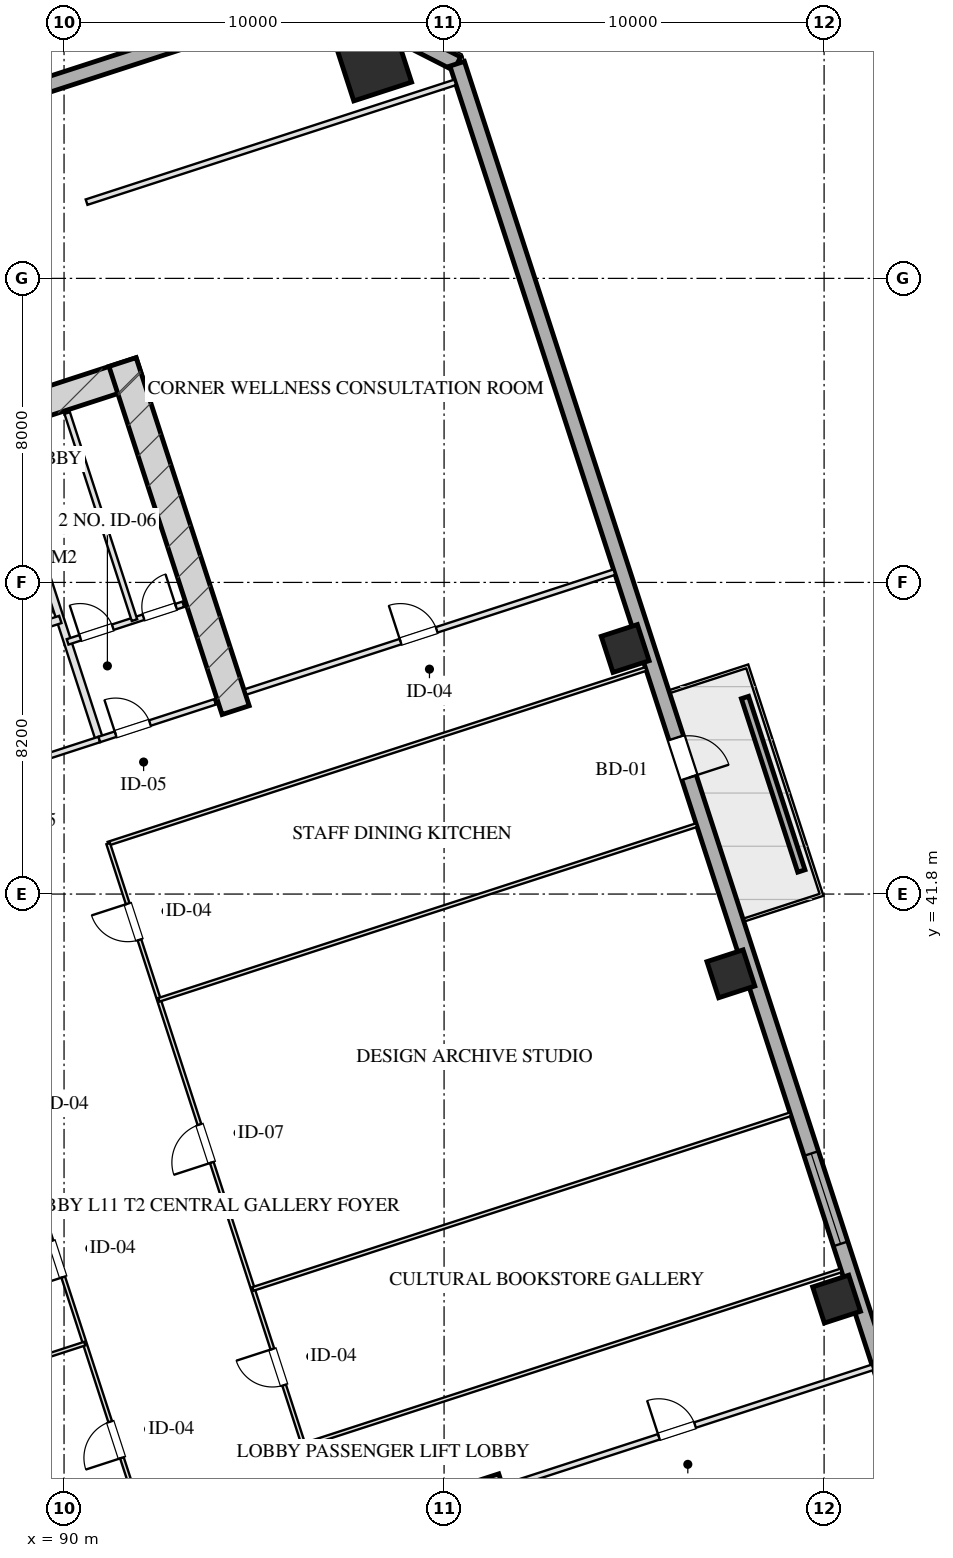
"""IFC4 building model, lengths in metres.
Left out: names, types, materials, properties, quantities, classifications, styles, units other than length and angle.
Written with IfcOpenShell. Run it as: python <this file> out.ifc"""

import sys

from ifc_helpers import new_model, si_unit, direction, frame, frame_2d, origin, origin_2d, place, context, subcontext, project, spatial, rectangle, hollow_rectangle, extrude, element, fill, save


model = new_model("IFC4")
c1 = context("Model", 3, precision=1e-05, world=origin(), true_north=direction((0.0, 1.0)))
c2 = subcontext(c1, "Body", "Model", "MODEL_VIEW")
j1 = project(units=[si_unit("LENGTHUNIT", "METRE"), si_unit("PLANEANGLEUNIT", "RADIAN")], contexts=[c1])
p1 = place(None, origin())
s1 = spatial("IfcSite", under=j1, at=p1, CompositionType="ELEMENT")
p2 = place(p1, origin())
s2 = spatial("IfcBuilding", under=s1, at=p2, CompositionType="ELEMENT")
p3 = place(p2, frame((0.0, 0.0, 50.6)))
s3 = spatial("IfcBuildingStorey", under=s2, at=p3, CompositionType="ELEMENT", Elevation=50.6)
p4 = place(p3, frame((101.082, 26.429, 0.0), z_axis=(0.0, 0.0, 1.0), x_axis=(0.309016134813, -0.951056795583, 0.0)))
e1 = element("IfcWall", 1, at=p4, inside=s3, PredefinedType="SHEAR", context=c2, shape_type="SweptSolid", body=[
    extrude(rectangle(XDim=9.63, YDim=0.75, at=frame_2d((4.815, 0.0))), origin(), (0.0, 0.0, 1.0), 3.45),
])
p5 = place(p3, frame((76.272, 50.443, 0.0), z_axis=(0.0, 0.0, 1.0), x_axis=(0.951056072937, 0.309018358888, 0.0)))
e2 = element("IfcWall", 2, at=p5, inside=s3, PredefinedType="SHEAR", context=c2, shape_type="SweptSolid", body=[
    extrude(rectangle(XDim=16.55, YDim=0.75, at=frame_2d((8.275, 0.0))), origin(), (0.0, 0.0, 1.0), 3.45),
])
p6 = place(p3, frame((94.515, 46.639, 0.0), z_axis=(0.0, 0.0, 1.0), x_axis=(-0.309016134813, 0.951056795583, 0.0)))
e3 = element("IfcWall", 3, at=p6, inside=s3, PredefinedType="SHEAR", context=c2, shape_type="SweptSolid", body=[
    extrude(rectangle(XDim=9.63, YDim=0.75, at=frame_2d((4.815, 0.0))), origin(), (0.0, 0.0, 1.0), 3.45),
])
p7 = place(p3, frame((98.137, 63.677, 0.0), z_axis=(0.0, 0.0, 1.0), x_axis=(0.951056516295, 0.309016994375, 0.0)))
e4 = element("IfcColumn", 4, at=p7, inside=s3, PredefinedType="COLUMN", context=c2, shape_type="SweptSolid", body=[
    extrude(hollow_rectangle(XDim=1.6, YDim=1.6, WallThickness=0.055, at=origin_2d()), origin(), (0.0, 0.0, 1.0), 3.451),
])
for number, where, z_axis, x_axis in (
    (5, (110.328, 31.142, 0.0), (0.0, 0.0, 1.0), (0.951, 0.309, 0.0)),
    (6, (107.547, 39.701, 0.0), (0.0, 0.0, 1.0), (0.951, 0.309, 0.0)),
    (7, (104.766, 48.261, 0.0), (0.0, 0.0, 1.0), (0.951, 0.309, 0.0)),
):
    element("IfcColumn", number, at=place(p3, frame(where, z_axis=z_axis, x_axis=x_axis)), inside=s3, PredefinedType="COLUMN", context=c2, shape_type="SweptSolid", body=[
        extrude(hollow_rectangle(XDim=1.0, YDim=1.0, WallThickness=0.036, at=origin_2d()), origin(), (0.0, 0.0, 1.0), 3.451),
    ])
p8 = place(p3, frame((66.002, 55.433, 0.0), z_axis=(0.0, 0.0, 1.0), x_axis=(0.951055939317, 0.309018770125, 0.0)))
e8 = element("IfcWall", 8, at=p8, inside=s3, PredefinedType="SOLIDWALL", context=c2, shape_type="SweptSolid", body=[
    extrude(rectangle(XDim=32.4, YDim=0.4, at=frame_2d((16.2, 0.0))), origin(), (0.0, 0.0, 1.0), 2.61),
])
p9 = place(p3, frame((96.816, 65.446, 0.0), z_axis=(0.0, 0.0, 1.0), x_axis=(0.890998089617, -0.454007053137, 0.0)))
e9 = element("IfcWall", 9, at=p9, inside=s3, PredefinedType="SOLIDWALL", context=c2, shape_type="SweptSolid", body=[
    extrude(rectangle(XDim=3.96, YDim=0.4, at=frame_2d((1.98, 0.0))), origin(), (0.0, 0.0, 1.0), 2.61),
])
p10 = place(p3, frame((100.345, 63.648, 0.0), z_axis=(0.0, 0.0, 1.0), x_axis=(0.309014526607, -0.951057318118, 0.0)))
e10 = element("IfcWall", 10, at=p10, inside=s3, PredefinedType="SOLIDWALL", context=c2, shape_type="SweptSolid", body=[
    extrude(rectangle(XDim=50.0, YDim=0.4, at=frame_2d((25.0, 0.0))), origin(), (0.0, 0.0, 1.0), 2.61),
])
p11 = place(p10, frame((30.15, 0.0, 0.75)))
e11 = element("IfcOpeningElement", 11, at=p11, cuts=e10, PredefinedType="OPENING", context=c2, shape_type="SweptSolid", body=[
    extrude(rectangle(XDim=2.5, YDim=1.46, at=frame_2d((1.25, 0.73))), frame((0.0, 0.21, 0.0), z_axis=(0.0, -1.0, 0.0), x_axis=(1.0, 0.0, 0.0)), (0.0, 0.0, 1.0), 0.42),
])
p12 = place(p10, frame((18.65, 0.0, 0.0)))
e12 = element("IfcOpeningElement", 12, at=p12, cuts=e10, PredefinedType="OPENING", context=c2, shape_type="SweptSolid", body=[
    extrude(rectangle(XDim=1.1, YDim=2.15, at=frame_2d((0.55, 1.075))), frame((0.0, 0.21, 0.0), z_axis=(0.0, -1.0, 0.0), x_axis=(1.0, 0.0, 0.0)), (0.0, 0.0, 1.0), 0.42),
])
p13 = place(p3, frame((109.402, 42.407, 0.0), z_axis=(0.0, 0.0, 1.0), x_axis=(-0.30900096172, 0.951061725471, 0.0)))
e13 = element("IfcWall", 13, at=p13, inside=s3, PredefinedType="PARAPET", context=c2, shape_type="SweptSolid", body=[
    extrude(rectangle(XDim=4.8, YDim=0.2, at=frame_2d((2.4, 0.0))), origin(), (0.0, 0.0, 1.0), 0.75),
])
p14 = place(p3, frame((90.928, 45.868, 0.0), z_axis=(0.0, 0.0, 1.0), x_axis=(-0.309042196757, 0.951048327176, 0.0)))
e14 = element("IfcWall", 14, at=p14, inside=s3, PredefinedType="PARTITIONING", context=c2, shape_type="SweptSolid", body=[
    extrude(rectangle(XDim=8.43, YDim=0.2, at=frame_2d((4.215, 0.0))), origin(), (0.0, 0.0, 1.0), 3.175),
])
p15 = place(p3, frame((86.743, 44.508, 0.0), z_axis=(0.0, 0.0, 1.0), x_axis=(0.951063829732, 0.308994485023, 0.0)))
e15 = element("IfcWall", 15, at=p15, inside=s3, PredefinedType="PARTITIONING", context=c2, shape_type="SweptSolid", body=[
    extrude(rectangle(XDim=4.4, YDim=0.15, at=frame_2d((2.2, 0.0))), origin(), (0.0, 0.0, 1.0), 3.175),
])
p16 = place(p15, frame((1.45, 0.0, 0.0)))
e16 = element("IfcOpeningElement", 16, at=p16, cuts=e15, PredefinedType="OPENING", context=c2, shape_type="SweptSolid", body=[
    extrude(rectangle(XDim=1.5, YDim=2.05, at=frame_2d((0.75, 1.025))), frame((0.0, 0.085, 0.0), z_axis=(0.0, -1.0, 0.0), x_axis=(1.0, 0.0, 0.0)), (0.0, 0.0, 1.0), 0.17),
])
p17 = place(p3, frame((85.718, 47.666, 0.0), z_axis=(0.0, 0.0, 1.0), x_axis=(0.951058531764, 0.30901079133, 0.0)))
e17 = element("IfcWall", 17, at=p17, inside=s3, PredefinedType="PARTITIONING", context=c2, shape_type="SweptSolid", body=[
    extrude(rectangle(XDim=4.4, YDim=0.2, at=frame_2d((2.2, 0.0))), origin(), (0.0, 0.0, 1.0), 3.175),
])
p18 = place(p17, frame((0.45, 0.0, 0.0)))
e18 = element("IfcOpeningElement", 18, at=p18, cuts=e17, PredefinedType="OPENING", context=c2, shape_type="SweptSolid", body=[
    extrude(rectangle(XDim=1.1, YDim=2.05, at=frame_2d((0.55, 1.025))), frame((0.0, 0.11, 0.0), z_axis=(0.0, -1.0, 0.0), x_axis=(1.0, 0.0, 0.0)), (0.0, 0.0, 1.0), 0.22),
])
p19 = place(p17, frame((2.55, 0.0, 0.0)))
e19 = element("IfcOpeningElement", 19, at=p19, cuts=e17, PredefinedType="OPENING", context=c2, shape_type="SweptSolid", body=[
    extrude(rectangle(XDim=1.1, YDim=2.05, at=frame_2d((0.55, 1.025))), frame((0.0, 0.11, 0.0), z_axis=(0.0, -1.0, 0.0), x_axis=(1.0, 0.0, 0.0)), (0.0, 0.0, 1.0), 0.22),
])
p20 = place(p3, frame((90.928, 45.868, 0.0), z_axis=(0.0, 0.0, 1.0), x_axis=(0.951059297078, 0.309008435874, 0.0)))
e20 = element("IfcWall", 20, at=p20, inside=s3, PredefinedType="PARTITIONING", context=c2, shape_type="SweptSolid", body=[
    extrude(rectangle(XDim=3.2, YDim=0.15, at=frame_2d((1.6, 0.0))), origin(), (0.0, 0.0, 1.0), 3.175),
])
p21 = place(p20, frame((0.45, 0.0, 0.0)))
e21 = element("IfcOpeningElement", 21, at=p21, cuts=e20, PredefinedType="OPENING", context=c2, shape_type="SweptSolid", body=[
    extrude(rectangle(XDim=0.95, YDim=2.05, at=frame_2d((0.475, 1.025))), frame((0.0, 0.085, 0.0), z_axis=(0.0, -1.0, 0.0), x_axis=(1.0, 0.0, 0.0)), (0.0, 0.0, 1.0), 0.17),
])
p22 = place(p3, frame((90.094, 48.436, 0.0), z_axis=(0.0, 0.0, 1.0), x_axis=(0.951066581729, 0.308986014439, 0.0)))
e22 = element("IfcWall", 22, at=p22, inside=s3, PredefinedType="PARTITIONING", context=c2, shape_type="SweptSolid", body=[
    extrude(rectangle(XDim=3.2, YDim=0.15, at=frame_2d((1.6, 0.0))), origin(), (0.0, 0.0, 1.0), 3.175),
])
p23 = place(p22, frame((0.35, 0.0, 0.0)))
e23 = element("IfcOpeningElement", 23, at=p23, cuts=e22, PredefinedType="OPENING", context=c2, shape_type="SweptSolid", body=[
    extrude(rectangle(XDim=0.9, YDim=2.05, at=frame_2d((0.45, 1.025))), frame((0.0, 0.085, 0.0), z_axis=(0.0, -1.0, 0.0), x_axis=(1.0, 0.0, 0.0)), (0.0, 0.0, 1.0), 0.17),
])
p24 = place(p22, frame((2.1, 0.0, 0.0)))
e24 = element("IfcOpeningElement", 24, at=p24, cuts=e22, PredefinedType="OPENING", context=c2, shape_type="SweptSolid", body=[
    extrude(rectangle(XDim=0.9, YDim=2.05, at=frame_2d((0.45, 1.025))), frame((0.0, 0.085, 0.0), z_axis=(0.0, -1.0, 0.0), x_axis=(1.0, 0.0, 0.0)), (0.0, 0.0, 1.0), 0.17),
])
p25 = place(p3, frame((91.853, 49.007, 0.0), z_axis=(0.0, 0.0, 1.0), x_axis=(-0.309022487551, 0.951054731437, 0.0)))
e25 = element("IfcWall", 25, at=p25, inside=s3, PredefinedType="PARTITIONING", context=c2, shape_type="SweptSolid", body=[
    extrude(rectangle(XDim=5.73, YDim=0.15, at=frame_2d((2.865, 0.0))), origin(), (0.0, 0.0, 1.0), 3.175),
])
p26 = place(p3, frame((101.578, 26.196, 0.0), z_axis=(0.0, 0.0, 1.0), x_axis=(0.951059043131, 0.309009217467, 0.0)))
e26 = element("IfcWall", 26, at=p26, inside=s3, PredefinedType="PARTITIONING", context=c2, shape_type="SweptSolid", body=[
    extrude(rectangle(XDim=10.2, YDim=0.15, at=frame_2d((5.1, 0.0))), origin(), (0.0, 0.0, 1.0), 3.175),
])
p27 = place(p26, frame((4.284, 0.0, 0.0)))
e27 = element("IfcOpeningElement", 27, at=p27, cuts=e26, PredefinedType="OPENING", context=c2, shape_type="SweptSolid", body=[
    extrude(rectangle(XDim=1.0, YDim=2.05, at=frame_2d((0.5, 1.025))), frame((0.0, 0.085, 0.0), z_axis=(0.0, -1.0, 0.0), x_axis=(1.0, 0.0, 0.0)), (0.0, 0.0, 1.0), 0.17),
])
p28 = place(p3, frame((90.593, 60.006, 0.0), z_axis=(0.0, 0.0, 1.0), x_axis=(0.951059043131, 0.309009217467, 0.0)))
e28 = element("IfcWall", 28, at=p28, inside=s3, PredefinedType="PARTITIONING", context=c2, shape_type="SweptSolid", body=[
    extrude(rectangle(XDim=10.2, YDim=0.15, at=frame_2d((5.1, 0.0))), origin(), (0.0, 0.0, 1.0), 3.175),
])
p29 = place(p3, frame((94.78, 47.119, 0.0), z_axis=(0.0, 0.0, 1.0), x_axis=(0.951054294345, 0.309023832749, 0.0)))
e29 = element("IfcWall", 29, at=p29, inside=s3, PredefinedType="PARTITIONING", context=c2, shape_type="SweptSolid", body=[
    extrude(rectangle(XDim=10.2, YDim=0.15, at=frame_2d((5.1, 0.0))), origin(), (0.0, 0.0, 1.0), 3.175),
])
p30 = place(p29, frame((4.284, 0.0, 0.0)))
e30 = element("IfcOpeningElement", 30, at=p30, cuts=e29, PredefinedType="OPENING", context=c2, shape_type="SweptSolid", body=[
    extrude(rectangle(XDim=1.0, YDim=2.05, at=frame_2d((0.5, 1.025))), frame((0.0, 0.085, 0.0), z_axis=(0.0, -1.0, 0.0), x_axis=(1.0, 0.0, 0.0)), (0.0, 0.0, 1.0), 0.17),
])
for number, where, z_axis, x_axis in (
    (31, (96.304, 27.3, 0.0), (0.0, 0.0, 1.0), (0.951, 0.309, 0.0)),
    (32, (91.162, 43.126, 0.0), (0.0, 0.0, 1.0), (0.951, 0.309, 0.0)),
):
    element("IfcWall", number, at=place(p3, frame(where, z_axis=z_axis, x_axis=x_axis)), inside=s3, PredefinedType="MOVABLE", context=c2, shape_type="SweptSolid", body=[
        extrude(rectangle(XDim=14.875, YDim=0.1, at=frame_2d((7.438, 0.0))), origin(), (0.0, 0.0, 1.0), 3.175),
    ])
p31 = place(p3, frame((91.882, 25.863, 0.0), z_axis=(0.0, 0.0, 1.0), x_axis=(-0.309022042254, 0.951054876125, 0.0)))
e33 = element("IfcWall", 33, at=p31, inside=s3, PredefinedType="MOVABLE", context=c2, shape_type="SweptSolid", body=[
    extrude(rectangle(XDim=16.64, YDim=0.1, at=frame_2d((8.32, 0.0))), origin(), (0.0, 0.0, 1.0), 3.175),
])
p32 = place(p31, frame((1.16, 0.0, 0.0)))
e34 = element("IfcOpeningElement", 34, at=p32, cuts=e33, PredefinedType="OPENING", context=c2, shape_type="SweptSolid", body=[
    extrude(rectangle(XDim=1.0, YDim=2.05, at=frame_2d((0.5, 1.025))), frame((0.0, 0.06, 0.0), z_axis=(0.0, -1.0, 0.0), x_axis=(1.0, 0.0, 0.0)), (0.0, 0.0, 1.0), 0.12),
])
p33 = place(p31, frame((6.16, 0.0, 0.0)))
e35 = element("IfcOpeningElement", 35, at=p33, cuts=e33, PredefinedType="OPENING", context=c2, shape_type="SweptSolid", body=[
    extrude(rectangle(XDim=1.0, YDim=2.05, at=frame_2d((0.5, 1.025))), frame((0.0, 0.06, 0.0), z_axis=(0.0, -1.0, 0.0), x_axis=(1.0, 0.0, 0.0)), (0.0, 0.0, 1.0), 0.12),
])
p34 = place(p31, frame((10.16, 0.0, 0.0)))
e36 = element("IfcOpeningElement", 36, at=p34, cuts=e33, PredefinedType="OPENING", context=c2, shape_type="SweptSolid", body=[
    extrude(rectangle(XDim=1.0, YDim=2.05, at=frame_2d((0.5, 1.025))), frame((0.0, 0.06, 0.0), z_axis=(0.0, -1.0, 0.0), x_axis=(1.0, 0.0, 0.0)), (0.0, 0.0, 1.0), 0.12),
])
p35 = place(p31, frame((14.48, 0.0, 0.0)))
e37 = element("IfcOpeningElement", 37, at=p35, cuts=e33, PredefinedType="OPENING", context=c2, shape_type="SweptSolid", body=[
    extrude(rectangle(XDim=1.0, YDim=2.05, at=frame_2d((0.5, 1.025))), frame((0.0, 0.06, 0.0), z_axis=(0.0, -1.0, 0.0), x_axis=(1.0, 0.0, 0.0)), (0.0, 0.0, 1.0), 0.12),
])
p36 = place(p3, frame((96.304, 27.3, 0.0), z_axis=(0.0, 0.0, 1.0), x_axis=(-0.30901773025, 0.951056277195, 0.0)))
e38 = element("IfcWall", 38, at=p36, inside=s3, PredefinedType="MOVABLE", context=c2, shape_type="SweptSolid", body=[
    extrude(rectangle(XDim=16.64, YDim=0.1, at=frame_2d((8.32, 0.0))), origin(), (0.0, 0.0, 1.0), 3.175),
])
p37 = place(p36, frame((1.66, 0.0, 0.0)))
e39 = element("IfcOpeningElement", 39, at=p37, cuts=e38, PredefinedType="OPENING", context=c2, shape_type="SweptSolid", body=[
    extrude(rectangle(XDim=1.0, YDim=2.05, at=frame_2d((0.5, 1.025))), frame((0.0, 0.06, 0.0), z_axis=(0.0, -1.0, 0.0), x_axis=(1.0, 0.0, 0.0)), (0.0, 0.0, 1.0), 0.12),
])
p38 = place(p36, frame((7.82, 0.0, 0.0)))
e40 = element("IfcOpeningElement", 40, at=p38, cuts=e38, PredefinedType="OPENING", context=c2, shape_type="SweptSolid", body=[
    extrude(rectangle(XDim=1.05, YDim=2.05, at=frame_2d((0.525, 1.025))), frame((0.0, 0.06, 0.0), z_axis=(0.0, -1.0, 0.0), x_axis=(1.0, 0.0, 0.0)), (0.0, 0.0, 1.0), 0.12),
])
p39 = place(p36, frame((13.98, 0.0, 0.0)))
e41 = element("IfcOpeningElement", 41, at=p39, cuts=e38, PredefinedType="OPENING", context=c2, shape_type="SweptSolid", body=[
    extrude(rectangle(XDim=1.0, YDim=2.05, at=frame_2d((0.5, 1.025))), frame((0.0, 0.06, 0.0), z_axis=(0.0, -1.0, 0.0), x_axis=(1.0, 0.0, 0.0)), (0.0, 0.0, 1.0), 0.12),
])
p40 = place(p3, frame((73.356, 24.386, 0.0), z_axis=(0.0, 0.0, 1.0), x_axis=(0.951057491432, 0.309013993197, 0.0)))
e42 = element("IfcWall", 42, at=p40, inside=s3, PredefinedType="MOVABLE", context=c2, shape_type="SweptSolid", body=[
    extrude(rectangle(XDim=18.075, YDim=0.1, at=frame_2d((9.038, 0.0))), origin(), (0.0, 0.0, 1.0), 3.175),
])
for number, where, z_axis, x_axis in (
    (43, (94.969, 31.409, 0.0), (0.0, 0.0, 1.0), (0.951, 0.309, 0.0)),
    (44, (92.497, 39.017, 0.0), (0.0, 0.0, 1.0), (0.951, 0.309, 0.0)),
):
    element("IfcWall", number, at=place(p3, frame(where, z_axis=z_axis, x_axis=x_axis)), inside=s3, PredefinedType="MOVABLE", context=c2, shape_type="SweptSolid", body=[
        extrude(rectangle(XDim=14.875, YDim=0.1, at=frame_2d((7.438, 0.0))), origin(), (0.0, 0.0, 1.0), 3.175),
    ])
p41 = place(p11, origin())
e45 = element("IfcWindow", 45, at=p41, inside=s3, PartitioningType="TRIPLE_PANEL_VERTICAL", PredefinedType="WINDOW", context=c2, shape_type="SweptSolid", body=[
    extrude(rectangle(XDim=2.5, YDim=1.46, at=frame_2d((1.25, 0.73))), frame((0.0, 0.03, 0.0), z_axis=(0.0, -1.0, 0.0), x_axis=(1.0, 0.0, 0.0)), (0.0, 0.0, 1.0), 0.06),
])
fill(e11, e45)
p42 = place(p12, origin())
e46 = element("IfcDoor", 46, at=p42, inside=s3, OperationType="SINGLE_SWING_RIGHT", PredefinedType="DOOR", context=c2, shape_type="SweptSolid", body=[
    extrude(rectangle(XDim=1.1, YDim=2.15, at=frame_2d((0.55, 1.075))), frame((0.0, 0.025, 0.0), z_axis=(0.0, -1.0, 0.0), x_axis=(1.0, 0.0, 0.0)), (0.0, 0.0, 1.0), 0.05),
])
fill(e12, e46)
p43 = place(p21, origin())
e47 = element("IfcDoor", 47, at=p43, inside=s3, OperationType="SINGLE_SWING_LEFT", PredefinedType="DOOR", context=c2, shape_type="SweptSolid", body=[
    extrude(rectangle(XDim=0.95, YDim=2.05, at=frame_2d((0.475, 1.025))), frame((0.0, 0.025, 0.0), z_axis=(0.0, -1.0, 0.0), x_axis=(1.0, 0.0, 0.0)), (0.0, 0.0, 1.0), 0.05),
])
fill(e21, e47)
p44 = place(p23, origin())
e48 = element("IfcDoor", 48, at=p44, inside=s3, OperationType="SINGLE_SWING_LEFT", PredefinedType="DOOR", context=c2, shape_type="SweptSolid", body=[
    extrude(rectangle(XDim=0.9, YDim=2.05, at=frame_2d((0.45, 1.025))), frame((0.0, 0.025, 0.0), z_axis=(0.0, -1.0, 0.0), x_axis=(1.0, 0.0, 0.0)), (0.0, 0.0, 1.0), 0.05),
])
fill(e23, e48)
p45 = place(p24, origin())
e49 = element("IfcDoor", 49, at=p45, inside=s3, OperationType="SINGLE_SWING_RIGHT", PredefinedType="DOOR", context=c2, shape_type="SweptSolid", body=[
    extrude(rectangle(XDim=0.9, YDim=2.05, at=frame_2d((0.45, 1.025))), frame((0.0, 0.025, 0.0), z_axis=(0.0, -1.0, 0.0), x_axis=(1.0, 0.0, 0.0)), (0.0, 0.0, 1.0), 0.05),
])
fill(e24, e49)
p46 = place(p27, origin())
e50 = element("IfcDoor", 50, at=p46, inside=s3, OperationType="SINGLE_SWING_LEFT", PredefinedType="DOOR", context=c2, shape_type="SweptSolid", body=[
    extrude(rectangle(XDim=1.0, YDim=2.05, at=frame_2d((0.5, 1.025))), frame((0.0, 0.025, 0.0), z_axis=(0.0, -1.0, 0.0), x_axis=(1.0, 0.0, 0.0)), (0.0, 0.0, 1.0), 0.05),
])
fill(e27, e50)
p47 = place(p30, origin())
e51 = element("IfcDoor", 51, at=p47, inside=s3, OperationType="SINGLE_SWING_LEFT", PredefinedType="DOOR", context=c2, shape_type="SweptSolid", body=[
    extrude(rectangle(XDim=1.0, YDim=2.05, at=frame_2d((0.5, 1.025))), frame((0.0, 0.025, 0.0), z_axis=(0.0, -1.0, 0.0), x_axis=(1.0, 0.0, 0.0)), (0.0, 0.0, 1.0), 0.05),
])
fill(e30, e51)
p48 = place(p32, origin())
e52 = element("IfcDoor", 52, at=p48, inside=s3, OperationType="SINGLE_SWING_LEFT", PredefinedType="DOOR", context=c2, shape_type="SweptSolid", body=[
    extrude(rectangle(XDim=1.0, YDim=2.05, at=frame_2d((0.5, 1.025))), frame((0.0, 0.025, 0.0), z_axis=(0.0, -1.0, 0.0), x_axis=(1.0, 0.0, 0.0)), (0.0, 0.0, 1.0), 0.05),
])
fill(e34, e52)
p49 = place(p33, origin())
e53 = element("IfcDoor", 53, at=p49, inside=s3, OperationType="SINGLE_SWING_LEFT", PredefinedType="DOOR", context=c2, shape_type="SweptSolid", body=[
    extrude(rectangle(XDim=1.0, YDim=2.05, at=frame_2d((0.5, 1.025))), frame((0.0, 0.025, 0.0), z_axis=(0.0, -1.0, 0.0), x_axis=(1.0, 0.0, 0.0)), (0.0, 0.0, 1.0), 0.05),
])
fill(e35, e53)
p50 = place(p37, origin())
e54 = element("IfcDoor", 54, at=p50, inside=s3, OperationType="SINGLE_SWING_RIGHT", PredefinedType="DOOR", context=c2, shape_type="SweptSolid", body=[
    extrude(rectangle(XDim=1.0, YDim=2.05, at=frame_2d((0.5, 1.025))), frame((0.0, 0.025, 0.0), z_axis=(0.0, -1.0, 0.0), x_axis=(1.0, 0.0, 0.0)), (0.0, 0.0, 1.0), 0.05),
])
fill(e39, e54)
p51 = place(p38, origin())
e55 = element("IfcDoor", 55, at=p51, inside=s3, OperationType="SINGLE_SWING_LEFT", PredefinedType="DOOR", context=c2, shape_type="SweptSolid", body=[
    extrude(rectangle(XDim=1.05, YDim=2.05, at=frame_2d((0.525, 1.025))), frame((0.0, 0.025, 0.0), z_axis=(0.0, -1.0, 0.0), x_axis=(1.0, 0.0, 0.0)), (0.0, 0.0, 1.0), 0.05),
])
fill(e40, e55)
p52 = place(p39, origin())
e56 = element("IfcDoor", 56, at=p52, inside=s3, OperationType="SINGLE_SWING_RIGHT", PredefinedType="DOOR", context=c2, shape_type="SweptSolid", body=[
    extrude(rectangle(XDim=1.0, YDim=2.05, at=frame_2d((0.5, 1.025))), frame((0.0, 0.025, 0.0), z_axis=(0.0, -1.0, 0.0), x_axis=(1.0, 0.0, 0.0)), (0.0, 0.0, 1.0), 0.05),
])
fill(e41, e56)
save(model, sys.argv[1])
